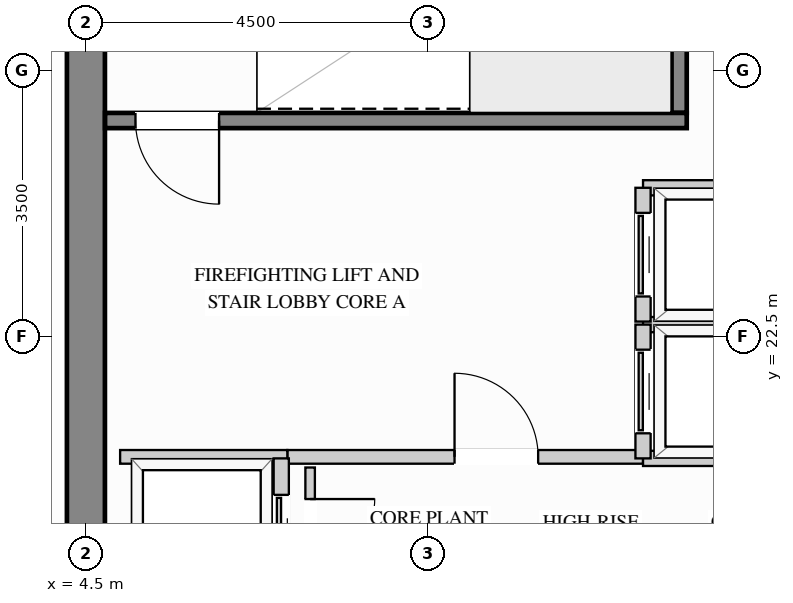
"""IFC4 building model, lengths in metres.
Left out: names, types, materials, properties, quantities, classifications, styles, units other than length and angle.
Written with IfcOpenShell. Run it as: python <this file> out.ifc"""

import sys

from ifc_helpers import new_model, si_unit, direction, frame, frame_2d, origin, place, context, subcontext, project, spatial, rectangle, extrude, source, transform, mapped, element, fill, save


model = new_model("IFC4")
c1 = context("Model", 3, precision=1e-05, world=origin(), true_north=direction((0.0, 1.0)))
c2 = subcontext(c1, "Body", "Model", "MODEL_VIEW")
j1 = project(units=[si_unit("LENGTHUNIT", "METRE"), si_unit("PLANEANGLEUNIT", "RADIAN")], contexts=[c1])
p1 = place(None, origin())
s1 = spatial("IfcSite", under=j1, at=p1, CompositionType="ELEMENT")
p2 = place(p1, origin())
s2 = spatial("IfcBuilding", under=s1, at=p2, CompositionType="ELEMENT")
p3 = place(p2, frame((0.0, 0.0, 262.8)))
s3 = spatial("IfcBuildingStorey", under=s2, at=p3, CompositionType="ELEMENT", Elevation=262.8)
m1 = source(origin(), c2, "Body", "SweptSolid", [
    extrude(rectangle(XDim=20.5, YDim=0.5, at=frame_2d((10.25, 0.0))), origin(), (0.0, 0.0, 1.0), 3.4),
])
p4 = place(p3, frame((4.5, 8.75, 0.0), z_axis=(0.0, 0.0, 1.0), x_axis=(0.0, 1.0, 0.0)))
e1 = element("IfcWall", 1, at=p4, inside=s3, PredefinedType="SHEAR", context=c2, shape_type="MappedRepresentation", body=[
    mapped(m1, transform((0.0, 0.0, 0.0), x_axis=(1.0, 0.0, 0.0), y_axis=(0.0, 1.0, 0.0), z_axis=(0.0, 0.0, 1.0))),
])
p5 = place(p3, frame((7.15, 20.92, 0.0), z_axis=(0.0, 0.0, 1.0), x_axis=(1.0, 0.0, 0.0)))
e2 = element("IfcWall", 2, at=p5, inside=s3, PredefinedType="PARTITIONING", context=c2, shape_type="SweptSolid", body=[
    extrude(rectangle(XDim=4.68, YDim=0.18, at=frame_2d((2.34, 0.0))), origin(), (0.0, 0.0, 1.0), 3.385),
])
p6 = place(p5, frame((2.2, 0.0, 0.0)))
e3 = element("IfcOpeningElement", 3, at=p6, cuts=e2, PredefinedType="OPENING", context=c2, shape_type="SweptSolid", body=[
    extrude(rectangle(XDim=1.1, YDim=2.15, at=frame_2d((0.55, 1.075))), frame((0.0, 0.1, 0.0), z_axis=(0.0, -1.0, 0.0), x_axis=(1.0, 0.0, 0.0)), (0.0, 0.0, 1.0), 0.2),
])
m2 = source(origin(), c2, "Body", "SweptSolid", [
    extrude(rectangle(XDim=2.2, YDim=0.18, at=frame_2d((1.1, 0.0))), origin(), (0.0, 0.0, 1.0), 3.385),
])
p7 = place(p3, frame((4.95, 20.92, 0.0), z_axis=(0.0, 0.0, 1.0), x_axis=(1.0, 0.0, 0.0)))
e4 = element("IfcWall", 4, at=p7, inside=s3, PredefinedType="PARTITIONING", context=c2, shape_type="MappedRepresentation", body=[
    mapped(m2, transform((0.0, 0.0, 0.0), x_axis=(1.0, 0.0, 0.0), y_axis=(0.0, 1.0, 0.0), z_axis=(0.0, 0.0, 1.0))),
])
p8 = place(p3, frame((7.45, 19.2, 0.0), z_axis=(0.0, 0.0, 1.0), x_axis=(0.0, 1.0, 0.0)))
e5 = element("IfcWall", 5, at=p8, inside=s3, PredefinedType="PARTITIONING", context=c2, shape_type="SweptSolid", body=[
    extrude(rectangle(XDim=1.58, YDim=0.125, at=frame_2d((0.79, 0.0))), origin(), (0.0, 0.0, 1.0), 3.385),
])
p9 = place(p8, frame((0.315, 0.0, 0.0)))
e6 = element("IfcOpeningElement", 6, at=p9, cuts=e5, PredefinedType="OPENING", context=c2, shape_type="SweptSolid", body=[
    extrude(rectangle(XDim=0.85, YDim=2.1, at=frame_2d((0.425, 1.05))), frame((0.0, 0.073, 0.0), z_axis=(0.0, -1.0, 0.0), x_axis=(1.0, 0.0, 0.0)), (0.0, 0.0, 1.0), 0.145),
])
m3 = source(origin(), c2, "Body", "SweptSolid", [
    extrude(rectangle(XDim=2.39, YDim=0.2, at=frame_2d((1.195, 0.0))), origin(), (0.0, 0.0, 1.0), 3.385),
])
for number, where, z_axis, x_axis in (
    (7, (11.83, 22.66, 0.0), (0.0, 0.0, 1.0), (1.0, 0.0, 0.0)),
    (8, (11.83, 20.9, 0.0), (0.0, 0.0, 1.0), (1.0, 0.0, 0.0)),
):
    element("IfcWall", number, at=place(p3, frame(where, z_axis=z_axis, x_axis=x_axis)), inside=s3, PredefinedType="PARTITIONING", context=c2, shape_type="MappedRepresentation", body=[
        mapped(m3, transform((0.0, 0.0, 0.0), x_axis=(1.0, 0.0, 0.0), y_axis=(0.0, 1.0, 0.0), z_axis=(0.0, 0.0, 1.0))),
    ])
p10 = place(p3, frame((11.83, 20.9, 0.0), z_axis=(0.0, 0.0, 1.0), x_axis=(0.0, 1.0, 0.0)))
e9 = element("IfcWall", 9, at=p10, inside=s3, PredefinedType="PARTITIONING", context=c2, shape_type="SweptSolid", body=[
    extrude(rectangle(XDim=1.76, YDim=0.2, at=frame_2d((0.88, 0.0))), origin(), (0.0, 0.0, 1.0), 3.385),
])
p11 = place(p10, frame((0.33, 0.0, 0.0)))
e10 = element("IfcOpeningElement", 10, at=p11, cuts=e9, PredefinedType="OPENING", context=c2, shape_type="SweptSolid", body=[
    extrude(rectangle(XDim=1.1, YDim=2.2, at=frame_2d((0.55, 1.1))), frame((0.0, 0.11, 0.0), z_axis=(0.0, -1.0, 0.0), x_axis=(1.0, 0.0, 0.0)), (0.0, 0.0, 1.0), 0.22),
])
p12 = place(p3, frame((11.83, 24.46, 0.0), z_axis=(0.0, 0.0, 1.0), x_axis=(1.0, 0.0, 0.0)))
e11 = element("IfcWall", 11, at=p12, inside=s3, PredefinedType="PARTITIONING", context=c2, shape_type="MappedRepresentation", body=[
    mapped(m3, transform((0.0, 0.0, 0.0), x_axis=(1.0, 0.0, 0.0), y_axis=(0.0, 1.0, 0.0), z_axis=(0.0, 0.0, 1.0))),
])
p13 = place(p3, frame((11.83, 22.7, 0.0), z_axis=(0.0, 0.0, 1.0), x_axis=(0.0, 1.0, 0.0)))
e12 = element("IfcWall", 12, at=p13, inside=s3, PredefinedType="PARTITIONING", context=c2, shape_type="SweptSolid", body=[
    extrude(rectangle(XDim=1.76, YDim=0.2, at=frame_2d((0.88, 0.0))), origin(), (0.0, 0.0, 1.0), 3.385),
])
p14 = place(p13, frame((0.33, 0.0, 0.0)))
e13 = element("IfcOpeningElement", 13, at=p14, cuts=e12, PredefinedType="OPENING", context=c2, shape_type="SweptSolid", body=[
    extrude(rectangle(XDim=1.1, YDim=2.2, at=frame_2d((0.55, 1.1))), frame((0.0, 0.11, 0.0), z_axis=(0.0, -1.0, 0.0), x_axis=(1.0, 0.0, 0.0)), (0.0, 0.0, 1.0), 0.22),
])
p15 = place(p3, frame((7.07, 18.84, 0.0), z_axis=(0.0, 0.0, 1.0), x_axis=(0.0, 1.0, 0.0)))
e14 = element("IfcWall", 14, at=p15, inside=s3, PredefinedType="PARTITIONING", context=c2, shape_type="SweptSolid", body=[
    extrude(rectangle(XDim=2.06, YDim=0.2, at=frame_2d((1.03, 0.0))), origin(), (0.0, 0.0, 1.0), 3.385),
])
p16 = place(p15, frame((0.48, 0.0, 0.0)))
e15 = element("IfcOpeningElement", 15, at=p16, cuts=e14, PredefinedType="OPENING", context=c2, shape_type="SweptSolid", body=[
    extrude(rectangle(XDim=1.1, YDim=2.2, at=frame_2d((0.55, 1.1))), frame((0.0, 0.11, 0.0), z_axis=(0.0, -1.0, 0.0), x_axis=(1.0, 0.0, 0.0)), (0.0, 0.0, 1.0), 0.22),
])
m4 = source(origin(), c2, "Body", "SweptSolid", [
    extrude(rectangle(XDim=3.803, YDim=0.2, at=frame_2d((1.901, 0.0))), origin(), (0.0, 0.0, 1.0), 3.4),
])
p17 = place(p3, frame((12.305, 25.445, 0.0), z_axis=(0.0, 0.0, 1.0), x_axis=(0.0, 1.0, 0.0)))
e16 = element("IfcWall", 16, at=p17, inside=s3, PredefinedType="SHEAR", context=c2, shape_type="MappedRepresentation", body=[
    mapped(m4, transform((0.0, 0.0, 0.0), x_axis=(1.0, 0.0, 0.0), y_axis=(0.0, 1.0, 0.0), z_axis=(0.0, 0.0, 1.0))),
])
p18 = place(p3, frame((4.752, 25.345, 0.0), z_axis=(0.0, 0.0, 1.0), x_axis=(1.0, 0.0, 0.0)))
e17 = element("IfcWall", 17, at=p18, inside=s3, PredefinedType="SHEAR", context=c2, shape_type="SweptSolid", body=[
    extrude(rectangle(XDim=7.653, YDim=0.2, at=frame_2d((3.827, 0.0))), origin(), (0.0, 0.0, 1.0), 3.4),
])
p19 = place(p18, frame((0.4, 0.0, 0.0)))
e18 = element("IfcOpeningElement", 18, at=p19, cuts=e17, PredefinedType="OPENING", context=c2, shape_type="SweptSolid", body=[
    extrude(rectangle(XDim=1.1, YDim=2.15, at=frame_2d((0.55, 1.075))), frame((0.0, 0.11, 0.0), z_axis=(0.0, -1.0, 0.0), x_axis=(1.0, 0.0, 0.0)), (0.0, 0.0, 1.0), 0.22),
])
m5 = source(origin(), c2, "Body", "SweptSolid", [
    extrude(rectangle(XDim=1.1, YDim=2.15, at=frame_2d((0.55, 1.075))), frame((0.0, 0.025, 0.0), z_axis=(0.0, -1.0, 0.0), x_axis=(1.0, 0.0, 0.0)), (0.0, 0.0, 1.0), 0.05),
])
p20 = place(p6, origin())
e19 = element("IfcDoor", 19, at=p20, inside=s3, OperationType="SINGLE_SWING_LEFT", PredefinedType="DOOR", context=c2, shape_type="MappedRepresentation", body=[
    mapped(m5, transform((0.0, 0.0, 0.0), x_axis=(1.0, 0.0, 0.0), y_axis=(0.0, 1.0, 0.0), z_axis=(0.0, 0.0, 1.0))),
])
fill(e3, e19)
m6 = source(origin(), c2, "Body", "SweptSolid", [
    extrude(rectangle(XDim=1.1, YDim=2.2, at=frame_2d((0.55, 1.1))), frame((0.0, 0.025, 0.0), z_axis=(0.0, -1.0, 0.0), x_axis=(1.0, 0.0, 0.0)), (0.0, 0.0, 1.0), 0.05),
])
p21 = place(p11, origin())
e20 = element("IfcDoor", 20, at=p21, inside=s3, OperationType="SLIDING_TO_LEFT", PredefinedType="DOOR", context=c2, shape_type="MappedRepresentation", body=[
    mapped(m6, transform((0.0, 0.0, 0.0), x_axis=(1.0, 0.0, 0.0), y_axis=(0.0, 1.0, 0.0), z_axis=(0.0, 0.0, 1.0))),
])
fill(e10, e20)
p22 = place(p14, origin())
e21 = element("IfcDoor", 21, at=p22, inside=s3, OperationType="SLIDING_TO_LEFT", PredefinedType="DOOR", context=c2, shape_type="MappedRepresentation", body=[
    mapped(m6, transform((0.0, 0.0, 0.0), x_axis=(1.0, 0.0, 0.0), y_axis=(0.0, 1.0, 0.0), z_axis=(0.0, 0.0, 1.0))),
])
fill(e13, e21)
p23 = place(p16, origin())
e22 = element("IfcDoor", 22, at=p23, inside=s3, OperationType="SLIDING_TO_LEFT", PredefinedType="DOOR", context=c2, shape_type="MappedRepresentation", body=[
    mapped(m6, transform((0.0, 0.0, 0.0), x_axis=(1.0, 0.0, 0.0), y_axis=(0.0, 1.0, 0.0), z_axis=(0.0, 0.0, 1.0))),
])
fill(e15, e22)
m7 = source(origin(), c2, "Body", "SweptSolid", [
    extrude(rectangle(XDim=0.85, YDim=2.1, at=frame_2d((0.425, 1.05))), frame((0.0, 0.025, 0.0), z_axis=(0.0, -1.0, 0.0), x_axis=(1.0, 0.0, 0.0)), (0.0, 0.0, 1.0), 0.05),
])
p24 = place(p9, origin())
e23 = element("IfcDoor", 23, at=p24, inside=s3, OperationType="SINGLE_SWING_RIGHT", PredefinedType="DOOR", context=c2, shape_type="MappedRepresentation", body=[
    mapped(m7, transform((0.0, 0.0, 0.0), x_axis=(1.0, 0.0, 0.0), y_axis=(0.0, 1.0, 0.0), z_axis=(0.0, 0.0, 1.0))),
])
fill(e6, e23)
m8 = source(origin(), c2, "Body", "SweptSolid", [
    extrude(rectangle(XDim=1.1, YDim=2.15, at=frame_2d((0.55, 1.075))), frame((0.0, 0.025, 0.0), z_axis=(0.0, -1.0, 0.0), x_axis=(1.0, 0.0, 0.0)), (0.0, 0.0, 1.0), 0.05),
])
p25 = place(p19, origin())
e24 = element("IfcDoor", 24, at=p25, inside=s3, OperationType="SINGLE_SWING_RIGHT", PredefinedType="DOOR", context=c2, shape_type="MappedRepresentation", body=[
    mapped(m8, transform((0.0, 0.0, 0.0), x_axis=(1.0, 0.0, 0.0), y_axis=(0.0, 1.0, 0.0), z_axis=(0.0, 0.0, 1.0))),
])
fill(e18, e24)
save(model, sys.argv[1])
